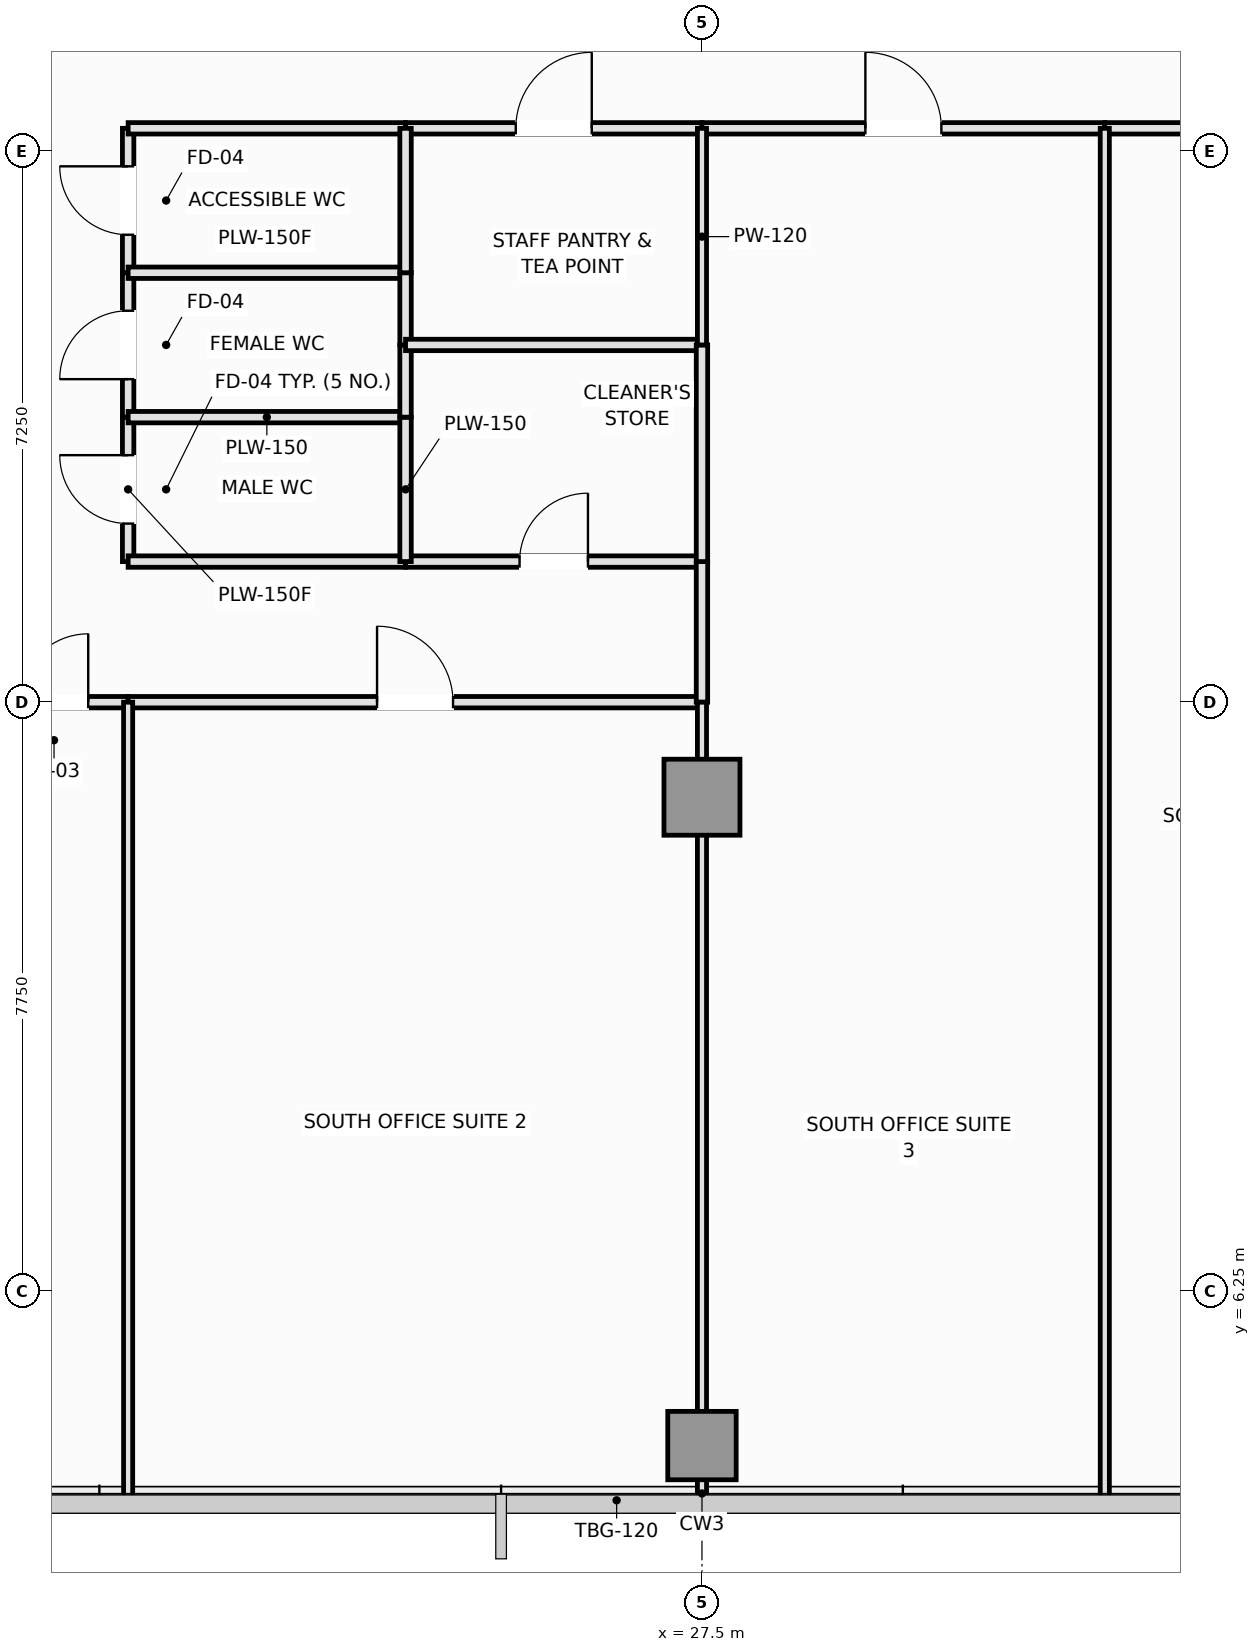
"""IFC4 building model, lengths in metres.
Left out: names, types, materials, properties, quantities, classifications, styles, units other than length and angle.
Written with IfcOpenShell. Run it as: python <this file> out.ifc"""

import sys

from ifc_helpers import new_model, si_unit, direction, frame, frame_2d, origin, origin_2d, place, context, subcontext, project, spatial, rectangle, extrude, element, fill, save


model = new_model("IFC4")
c1 = context("Model", 3, precision=1e-05, world=origin(), true_north=direction((0.0, 1.0)))
c2 = subcontext(c1, "Body", "Model", "MODEL_VIEW")
j1 = project(units=[si_unit("LENGTHUNIT", "METRE"), si_unit("PLANEANGLEUNIT", "RADIAN")], contexts=[c1])
p1 = place(None, origin())
s1 = spatial("IfcSite", under=j1, at=p1, CompositionType="ELEMENT")
p2 = place(p1, origin())
s2 = spatial("IfcBuilding", under=s1, at=p2, CompositionType="ELEMENT")
p3 = place(p2, frame((0.0, 0.0, 127.1)))
s3 = spatial("IfcBuildingStorey", under=s2, at=p3, CompositionType="ELEMENT", Elevation=127.1)
p4 = place(p3, frame((27.5, 12.75, 0.0), z_axis=(0.0, 0.0, 1.0), x_axis=(1.0, 0.0, 0.0)))
e1 = element("IfcColumn", 1, at=p4, inside=s3, PredefinedType="COLUMN", context=c2, shape_type="SweptSolid", body=[
    extrude(rectangle(XDim=1.0, YDim=1.0, at=origin_2d()), origin(), (0.0, 0.0, 1.0), 3.55),
])
p5 = place(p3, frame((27.5, 4.22, 0.0), z_axis=(0.0, 0.0, 1.0), x_axis=(1.0, 0.0, 0.0)))
e2 = element("IfcColumn", 2, at=p5, inside=s3, PredefinedType="COLUMN", context=c2, shape_type="SweptSolid", body=[
    extrude(rectangle(XDim=0.9, YDim=0.9, at=origin_2d()), origin(), (0.0, 0.0, 1.0), 3.55),
])
p6 = place(p3, frame((19.95, 15.85, 0.0), z_axis=(0.0, 0.0, 1.0), x_axis=(0.0, 1.0, 0.0)))
e3 = element("IfcWall", 3, at=p6, inside=s3, PredefinedType="PLUMBINGWALL", context=c2, shape_type="SweptSolid", body=[
    extrude(rectangle(XDim=1.9, YDim=0.15, at=frame_2d((0.95, 0.0))), origin(), (0.0, 0.0, 1.0), 3.37),
])
p7 = place(p6, frame((0.5, 0.0, 0.0)))
e4 = element("IfcOpeningElement", 4, at=p7, cuts=e3, PredefinedType="OPENING", context=c2, shape_type="SweptSolid", body=[
    extrude(rectangle(XDim=0.9, YDim=2.1, at=frame_2d((0.45, 1.05))), frame((0.0, 0.085, 0.0), z_axis=(0.0, -1.0, 0.0), x_axis=(1.0, 0.0, 0.0)), (0.0, 0.0, 1.0), 0.17),
])
p8 = place(p3, frame((19.95, 17.75, 0.0), z_axis=(0.0, 0.0, 1.0), x_axis=(0.0, 1.0, 0.0)))
e5 = element("IfcWall", 5, at=p8, inside=s3, PredefinedType="PLUMBINGWALL", context=c2, shape_type="SweptSolid", body=[
    extrude(rectangle(XDim=1.9, YDim=0.15, at=frame_2d((0.95, 0.0))), origin(), (0.0, 0.0, 1.0), 3.37),
])
p9 = place(p8, frame((0.5, 0.0, 0.0)))
e6 = element("IfcOpeningElement", 6, at=p9, cuts=e5, PredefinedType="OPENING", context=c2, shape_type="SweptSolid", body=[
    extrude(rectangle(XDim=0.9, YDim=2.1, at=frame_2d((0.45, 1.05))), frame((0.0, 0.085, 0.0), z_axis=(0.0, -1.0, 0.0), x_axis=(1.0, 0.0, 0.0)), (0.0, 0.0, 1.0), 0.17),
])
p10 = place(p3, frame((19.95, 19.65, 0.0), z_axis=(0.0, 0.0, 1.0), x_axis=(0.0, 1.0, 0.0)))
e7 = element("IfcWall", 7, at=p10, inside=s3, PredefinedType="PLUMBINGWALL", context=c2, shape_type="SweptSolid", body=[
    extrude(rectangle(XDim=1.9, YDim=0.15, at=frame_2d((0.95, 0.0))), origin(), (0.0, 0.0, 1.0), 3.37),
])
p11 = place(p10, frame((0.5, 0.0, 0.0)))
e8 = element("IfcOpeningElement", 8, at=p11, cuts=e7, PredefinedType="OPENING", context=c2, shape_type="SweptSolid", body=[
    extrude(rectangle(XDim=0.9, YDim=2.1, at=frame_2d((0.45, 1.05))), frame((0.0, 0.085, 0.0), z_axis=(0.0, -1.0, 0.0), x_axis=(1.0, 0.0, 0.0)), (0.0, 0.0, 1.0), 0.17),
])
p12 = place(p3, frame((18.0, 14.0, 0.0), z_axis=(0.0, 0.0, 1.0), x_axis=(1.0, 0.0, 0.0)))
e9 = element("IfcWall", 9, at=p12, inside=s3, PredefinedType="PARTITIONING", context=c2, shape_type="SweptSolid", body=[
    extrude(rectangle(XDim=1.95, YDim=0.15, at=frame_2d((0.975, 0.0))), origin(), (0.0, 0.0, 1.0), 3.37),
])
p13 = place(p12, frame((0.525, 0.0, 0.0)))
e10 = element("IfcOpeningElement", 10, at=p13, cuts=e9, PredefinedType="OPENING", context=c2, shape_type="SweptSolid", body=[
    extrude(rectangle(XDim=0.9, YDim=2.1, at=frame_2d((0.45, 1.05))), frame((0.0, 0.085, 0.0), z_axis=(0.0, -1.0, 0.0), x_axis=(1.0, 0.0, 0.0)), (0.0, 0.0, 1.0), 0.17),
])
p14 = place(p3, frame((19.95, 21.55, 0.0), z_axis=(0.0, 0.0, 1.0), x_axis=(1.0, 0.0, 0.0)))
e11 = element("IfcWall", 11, at=p14, inside=s3, PredefinedType="PLUMBINGWALL", context=c2, shape_type="SweptSolid", body=[
    extrude(rectangle(XDim=3.65, YDim=0.15, at=frame_2d((1.825, 0.0))), origin(), (0.0, 0.0, 1.0), 3.37),
])
p15 = place(p3, frame((23.6, 21.55, 0.0), z_axis=(0.0, 0.0, 1.0), x_axis=(1.0, 0.0, 0.0)))
e12 = element("IfcWall", 12, at=p15, inside=s3, PredefinedType="PARTITIONING", context=c2, shape_type="SweptSolid", body=[
    extrude(rectangle(XDim=3.9, YDim=0.15, at=frame_2d((1.95, 0.0))), origin(), (0.0, 0.0, 1.0), 3.37),
])
p16 = place(p15, frame((1.45, 0.0, 0.0)))
e13 = element("IfcOpeningElement", 13, at=p16, cuts=e12, PredefinedType="OPENING", context=c2, shape_type="SweptSolid", body=[
    extrude(rectangle(XDim=1.0, YDim=2.15, at=frame_2d((0.5, 1.075))), frame((0.0, 0.085, 0.0), z_axis=(0.0, -1.0, 0.0), x_axis=(1.0, 0.0, 0.0)), (0.0, 0.0, 1.0), 0.17),
])
p17 = place(p3, frame((27.5, 21.55, 0.0), z_axis=(0.0, 0.0, 1.0), x_axis=(1.0, 0.0, 0.0)))
e14 = element("IfcWall", 14, at=p17, inside=s3, PredefinedType="PARTITIONING", context=c2, shape_type="SweptSolid", body=[
    extrude(rectangle(XDim=5.3, YDim=0.15, at=frame_2d((2.65, 0.0))), origin(), (0.0, 0.0, 1.0), 3.37),
])
p18 = place(p17, frame((2.15, 0.0, 0.0)))
e15 = element("IfcOpeningElement", 15, at=p18, cuts=e14, PredefinedType="OPENING", context=c2, shape_type="SweptSolid", body=[
    extrude(rectangle(XDim=1.0, YDim=2.15, at=frame_2d((0.5, 1.075))), frame((0.0, 0.085, 0.0), z_axis=(0.0, -1.0, 0.0), x_axis=(1.0, 0.0, 0.0)), (0.0, 0.0, 1.0), 0.17),
])
p19 = place(p3, frame((32.8, 21.55, 0.0), z_axis=(0.0, 0.0, 1.0), x_axis=(1.0, 0.0, 0.0)))
e16 = element("IfcWall", 16, at=p19, inside=s3, PredefinedType="PARTITIONING", context=c2, shape_type="SweptSolid", body=[
    extrude(rectangle(XDim=3.4, YDim=0.15, at=frame_2d((1.7, 0.0))), origin(), (0.0, 0.0, 1.0), 3.37),
])
p20 = place(p19, frame((1.2, 0.0, 0.0)))
e17 = element("IfcOpeningElement", 17, at=p20, cuts=e16, PredefinedType="OPENING", context=c2, shape_type="SweptSolid", body=[
    extrude(rectangle(XDim=1.0, YDim=2.15, at=frame_2d((0.5, 1.075))), frame((0.0, 0.085, 0.0), z_axis=(0.0, -1.0, 0.0), x_axis=(1.0, 0.0, 0.0)), (0.0, 0.0, 1.0), 0.17),
])
p21 = place(p3, frame((19.95, 15.85, 0.0), z_axis=(0.0, 0.0, 1.0), x_axis=(1.0, 0.0, 0.0)))
e18 = element("IfcWall", 18, at=p21, inside=s3, PredefinedType="PLUMBINGWALL", context=c2, shape_type="SweptSolid", body=[
    extrude(rectangle(XDim=3.65, YDim=0.15, at=frame_2d((1.825, 0.0))), origin(), (0.0, 0.0, 1.0), 3.37),
])
p22 = place(p3, frame((23.6, 15.85, 0.0), z_axis=(0.0, 0.0, 1.0), x_axis=(1.0, 0.0, 0.0)))
e19 = element("IfcWall", 19, at=p22, inside=s3, PredefinedType="PLUMBINGWALL", context=c2, shape_type="SweptSolid", body=[
    extrude(rectangle(XDim=3.9, YDim=0.15, at=frame_2d((1.95, 0.0))), origin(), (0.0, 0.0, 1.0), 3.37),
])
p23 = place(p22, frame((1.5, 0.0, 0.0)))
e20 = element("IfcOpeningElement", 20, at=p23, cuts=e19, PredefinedType="OPENING", context=c2, shape_type="SweptSolid", body=[
    extrude(rectangle(XDim=0.9, YDim=2.1, at=frame_2d((0.45, 1.05))), frame((0.0, 0.085, 0.0), z_axis=(0.0, -1.0, 0.0), x_axis=(1.0, 0.0, 0.0)), (0.0, 0.0, 1.0), 0.17),
])
p24 = place(p3, frame((19.95, 14.0, 0.0), z_axis=(0.0, 0.0, 1.0), x_axis=(1.0, 0.0, 0.0)))
e21 = element("IfcWall", 21, at=p24, inside=s3, PredefinedType="PARTITIONING", context=c2, shape_type="SweptSolid", body=[
    extrude(rectangle(XDim=7.55, YDim=0.15, at=frame_2d((3.775, 0.0))), origin(), (0.0, 0.0, 1.0), 3.37),
])
p25 = place(p24, frame((3.275, 0.0, 0.0)))
e22 = element("IfcOpeningElement", 22, at=p25, cuts=e21, PredefinedType="OPENING", context=c2, shape_type="SweptSolid", body=[
    extrude(rectangle(XDim=1.0, YDim=2.15, at=frame_2d((0.5, 1.075))), frame((0.0, 0.085, 0.0), z_axis=(0.0, -1.0, 0.0), x_axis=(1.0, 0.0, 0.0)), (0.0, 0.0, 1.0), 0.17),
])
p26 = place(p3, frame((27.5, 14.0, 0.0), z_axis=(0.0, 0.0, 1.0), x_axis=(0.0, 1.0, 0.0)))
e23 = element("IfcWall", 23, at=p26, inside=s3, PredefinedType="PARTITIONING", context=c2, shape_type="SweptSolid", body=[
    extrude(rectangle(XDim=1.85, YDim=0.15, at=frame_2d((0.925, 0.0))), origin(), (0.0, 0.0, 1.0), 3.37),
])
p27 = place(p3, frame((19.95, 17.75, 0.0), z_axis=(0.0, 0.0, 1.0), x_axis=(1.0, 0.0, 0.0)))
e24 = element("IfcWall", 24, at=p27, inside=s3, PredefinedType="PLUMBINGWALL", context=c2, shape_type="SweptSolid", body=[
    extrude(rectangle(XDim=3.65, YDim=0.15, at=frame_2d((1.825, 0.0))), origin(), (0.0, 0.0, 1.0), 3.37),
])
p28 = place(p3, frame((23.6, 15.85, 0.0), z_axis=(0.0, 0.0, 1.0), x_axis=(0.0, 1.0, 0.0)))
e25 = element("IfcWall", 25, at=p28, inside=s3, PredefinedType="PLUMBINGWALL", context=c2, shape_type="SweptSolid", body=[
    extrude(rectangle(XDim=1.9, YDim=0.15, at=frame_2d((0.95, 0.0))), origin(), (0.0, 0.0, 1.0), 3.37),
])
p29 = place(p3, frame((19.95, 19.65, 0.0), z_axis=(0.0, 0.0, 1.0), x_axis=(1.0, 0.0, 0.0)))
e26 = element("IfcWall", 26, at=p29, inside=s3, PredefinedType="PLUMBINGWALL", context=c2, shape_type="SweptSolid", body=[
    extrude(rectangle(XDim=3.65, YDim=0.15, at=frame_2d((1.825, 0.0))), origin(), (0.0, 0.0, 1.0), 3.37),
])
for number, where, z_axis, x_axis in (
    (27, (23.6, 17.75, 0.0), (0.0, 0.0, 1.0), (0.0, 1.0, 0.0)),
    (28, (23.6, 18.7, 0.0), (0.0, 0.0, 1.0), (0.0, 1.0, 0.0)),
):
    element("IfcWall", number, at=place(p3, frame(where, z_axis=z_axis, x_axis=x_axis)), inside=s3, PredefinedType="PLUMBINGWALL", context=c2, shape_type="SweptSolid", body=[
        extrude(rectangle(XDim=0.95, YDim=0.15, at=frame_2d((0.475, 0.0))), origin(), (0.0, 0.0, 1.0), 3.37),
    ])
p30 = place(p3, frame((23.6, 19.65, 0.0), z_axis=(0.0, 0.0, 1.0), x_axis=(0.0, 1.0, 0.0)))
e29 = element("IfcWall", 29, at=p30, inside=s3, PredefinedType="PLUMBINGWALL", context=c2, shape_type="SweptSolid", body=[
    extrude(rectangle(XDim=1.9, YDim=0.15, at=frame_2d((0.95, 0.0))), origin(), (0.0, 0.0, 1.0), 3.37),
])
p31 = place(p3, frame((23.6, 18.7, 0.0), z_axis=(0.0, 0.0, 1.0), x_axis=(1.0, 0.0, 0.0)))
e30 = element("IfcWall", 30, at=p31, inside=s3, PredefinedType="PLUMBINGWALL", context=c2, shape_type="SweptSolid", body=[
    extrude(rectangle(XDim=3.9, YDim=0.15, at=frame_2d((1.95, 0.0))), origin(), (0.0, 0.0, 1.0), 3.37),
])
p32 = place(p3, frame((27.5, 15.85, 0.0), z_axis=(0.0, 0.0, 1.0), x_axis=(0.0, 1.0, 0.0)))
e31 = element("IfcWall", 31, at=p32, inside=s3, PredefinedType="PLUMBINGWALL", context=c2, shape_type="SweptSolid", body=[
    extrude(rectangle(XDim=2.85, YDim=0.15, at=frame_2d((1.425, 0.0))), origin(), (0.0, 0.0, 1.0), 3.37),
])
p33 = place(p3, frame((27.5, 18.7, 0.0), z_axis=(0.0, 0.0, 1.0), x_axis=(0.0, 1.0, 0.0)))
e32 = element("IfcWall", 32, at=p33, inside=s3, PredefinedType="PARTITIONING", context=c2, shape_type="SweptSolid", body=[
    extrude(rectangle(XDim=2.85, YDim=0.12, at=frame_2d((1.425, 0.0))), origin(), (0.0, 0.0, 1.0), 3.37),
])
p34 = place(p3, frame((19.95, 3.51, 0.0), z_axis=(0.0, 0.0, 1.0), x_axis=(0.0, 1.0, 0.0)))
e33 = element("IfcWall", 33, at=p34, inside=s3, PredefinedType="PARTITIONING", context=c2, shape_type="SweptSolid", body=[
    extrude(rectangle(XDim=10.49, YDim=0.12, at=frame_2d((5.245, 0.0))), origin(), (0.0, 0.0, 1.0), 3.37),
])
p35 = place(p3, frame((27.5, 3.51, 0.0), z_axis=(0.0, 0.0, 1.0), x_axis=(0.0, 1.0, 0.0)))
e34 = element("IfcWall", 34, at=p35, inside=s3, PredefinedType="PARTITIONING", context=c2, shape_type="SweptSolid", body=[
    extrude(rectangle(XDim=10.49, YDim=0.12, at=frame_2d((5.245, 0.0))), origin(), (0.0, 0.0, 1.0), 2.87),
])
p36 = place(p3, frame((32.8, 3.51, 0.0), z_axis=(0.0, 0.0, 1.0), x_axis=(0.0, 1.0, 0.0)))
e35 = element("IfcWall", 35, at=p36, inside=s3, PredefinedType="PARTITIONING", context=c2, shape_type="SweptSolid", body=[
    extrude(rectangle(XDim=18.04, YDim=0.12, at=frame_2d((9.02, 0.0))), origin(), (0.0, 0.0, 1.0), 3.37),
])
p37 = place(p7, origin())
e36 = element("IfcDoor", 36, at=p37, inside=s3, OperationType="SINGLE_SWING_RIGHT", PredefinedType="DOOR", context=c2, shape_type="SweptSolid", body=[
    extrude(rectangle(XDim=0.9, YDim=2.1, at=frame_2d((0.45, 1.05))), frame((0.0, 0.025, 0.0), z_axis=(0.0, -1.0, 0.0), x_axis=(1.0, 0.0, 0.0)), (0.0, 0.0, 1.0), 0.05),
])
fill(e4, e36)
p38 = place(p9, origin())
e37 = element("IfcDoor", 37, at=p38, inside=s3, OperationType="SINGLE_SWING_LEFT", PredefinedType="DOOR", context=c2, shape_type="SweptSolid", body=[
    extrude(rectangle(XDim=0.9, YDim=2.1, at=frame_2d((0.45, 1.05))), frame((0.0, 0.025, 0.0), z_axis=(0.0, -1.0, 0.0), x_axis=(1.0, 0.0, 0.0)), (0.0, 0.0, 1.0), 0.05),
])
fill(e6, e37)
p39 = place(p11, origin())
e38 = element("IfcDoor", 38, at=p39, inside=s3, OperationType="SINGLE_SWING_RIGHT", PredefinedType="DOOR", context=c2, shape_type="SweptSolid", body=[
    extrude(rectangle(XDim=0.9, YDim=2.1, at=frame_2d((0.45, 1.05))), frame((0.0, 0.025, 0.0), z_axis=(0.0, -1.0, 0.0), x_axis=(1.0, 0.0, 0.0)), (0.0, 0.0, 1.0), 0.05),
])
fill(e8, e38)
p40 = place(p13, origin())
e39 = element("IfcDoor", 39, at=p40, inside=s3, OperationType="SINGLE_SWING_RIGHT", PredefinedType="DOOR", context=c2, shape_type="SweptSolid", body=[
    extrude(rectangle(XDim=0.9, YDim=2.1, at=frame_2d((0.45, 1.05))), frame((0.0, 0.025, 0.0), z_axis=(0.0, -1.0, 0.0), x_axis=(1.0, 0.0, 0.0)), (0.0, 0.0, 1.0), 0.05),
])
fill(e10, e39)
p41 = place(p16, origin())
e40 = element("IfcDoor", 40, at=p41, inside=s3, OperationType="SINGLE_SWING_RIGHT", PredefinedType="DOOR", context=c2, shape_type="SweptSolid", body=[
    extrude(rectangle(XDim=1.0, YDim=2.15, at=frame_2d((0.5, 1.075))), frame((0.0, 0.025, 0.0), z_axis=(0.0, -1.0, 0.0), x_axis=(1.0, 0.0, 0.0)), (0.0, 0.0, 1.0), 0.05),
])
fill(e13, e40)
p42 = place(p18, origin())
e41 = element("IfcDoor", 41, at=p42, inside=s3, OperationType="SINGLE_SWING_LEFT", PredefinedType="DOOR", context=c2, shape_type="SweptSolid", body=[
    extrude(rectangle(XDim=1.0, YDim=2.15, at=frame_2d((0.5, 1.075))), frame((0.0, 0.025, 0.0), z_axis=(0.0, -1.0, 0.0), x_axis=(1.0, 0.0, 0.0)), (0.0, 0.0, 1.0), 0.05),
])
fill(e15, e41)
p43 = place(p23, origin())
e42 = element("IfcDoor", 42, at=p43, inside=s3, OperationType="SINGLE_SWING_RIGHT", PredefinedType="DOOR", context=c2, shape_type="SweptSolid", body=[
    extrude(rectangle(XDim=0.9, YDim=2.1, at=frame_2d((0.45, 1.05))), frame((0.0, 0.025, 0.0), z_axis=(0.0, -1.0, 0.0), x_axis=(1.0, 0.0, 0.0)), (0.0, 0.0, 1.0), 0.05),
])
fill(e20, e42)
p44 = place(p25, origin())
e43 = element("IfcDoor", 43, at=p44, inside=s3, OperationType="SINGLE_SWING_LEFT", PredefinedType="DOOR", context=c2, shape_type="SweptSolid", body=[
    extrude(rectangle(XDim=1.0, YDim=2.15, at=frame_2d((0.5, 1.075))), frame((0.0, 0.025, 0.0), z_axis=(0.0, -1.0, 0.0), x_axis=(1.0, 0.0, 0.0)), (0.0, 0.0, 1.0), 0.05),
])
fill(e22, e43)
save(model, sys.argv[1])
